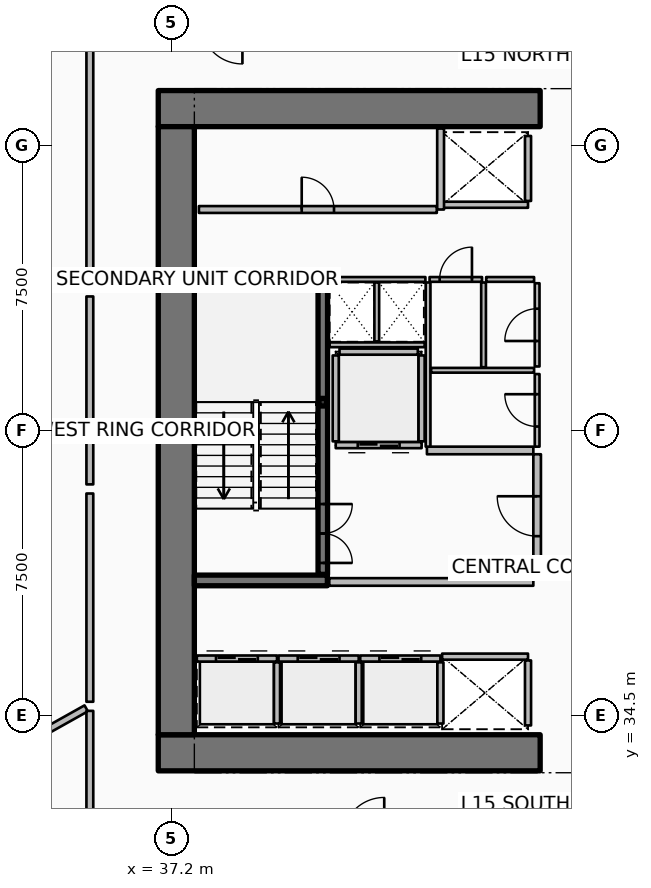
"""IFC4 building model, lengths in metres.
Left out: names, types, materials, properties, quantities, classifications, styles, units other than length and angle.
Written with IfcOpenShell. Run it as: python <this file> out.ifc"""

import sys

from ifc_helpers import new_model, si_unit, direction, frame, frame_2d, origin, origin_2d, place, context, subcontext, project, spatial, rectangle, hollow_rectangle, extrude, element, fill, save


model = new_model("IFC4")
c1 = context("Model", 3, precision=1e-05, world=origin(), true_north=direction((0.0, 1.0)))
c2 = subcontext(c1, "Body", "Model", "MODEL_VIEW")
j1 = project(units=[si_unit("LENGTHUNIT", "METRE"), si_unit("PLANEANGLEUNIT", "RADIAN")], contexts=[c1])
p1 = place(None, origin())
s1 = spatial("IfcSite", under=j1, at=p1, CompositionType="ELEMENT")
p2 = place(p1, origin())
s2 = spatial("IfcBuilding", under=s1, at=p2, CompositionType="ELEMENT")
p3 = place(p2, frame((0.0, 0.0, 63.9)))
s3 = spatial("IfcBuildingStorey", under=s2, at=p3, CompositionType="ELEMENT", Elevation=63.9)
for number, where, z_axis, x_axis in (
    (1, (36.85, 33.525, 0.0), (0.0, 0.0, 1.0), (1.0, 0.0, 0.0)),
    (2, (36.85, 50.475, 0.0), (0.0, 0.0, 1.0), (1.0, 0.0, 0.0)),
):
    element("IfcWall", number, at=place(p3, frame(where, z_axis=z_axis, x_axis=x_axis)), inside=s3, PredefinedType="SHEAR", context=c2, shape_type="SweptSolid", body=[
        extrude(rectangle(XDim=10.05, YDim=0.95, at=frame_2d((5.025, 0.0))), origin(), (0.0, 0.0, 1.0), 3.75),
    ])
p4 = place(p3, frame((37.325, 34.0, 0.0), z_axis=(0.0, 0.0, 1.0), x_axis=(0.0, 1.0, 0.0)))
e3 = element("IfcWall", 3, at=p4, inside=s3, PredefinedType="SHEAR", context=c2, shape_type="SweptSolid", body=[
    extrude(rectangle(XDim=16.0, YDim=0.95, at=frame_2d((8.0, 0.0))), origin(), (0.0, 0.0, 1.0), 3.75),
])
for number, where, z_axis, x_axis in (
    (4, (37.8, 38.06, 0.0), (0.0, 0.0, 1.0), (1.0, 0.0, 0.0)),
    (5, (37.8, 45.94, 0.0), (0.0, 0.0, 1.0), (1.0, 0.0, 0.0)),
):
    element("IfcWall", number, at=place(p3, frame(where, z_axis=z_axis, x_axis=x_axis)), inside=s3, PredefinedType="SHEAR", context=c2, shape_type="SweptSolid", body=[
        extrude(rectangle(XDim=3.5, YDim=0.28, at=frame_2d((1.75, 0.0))), origin(), (0.0, 0.0, 1.0), 3.75),
    ])
p5 = place(p3, frame((41.18, 42.75, 0.0), z_axis=(0.0, 0.0, 1.0), x_axis=(1.0, 0.0, 0.0)))
e6 = element("IfcColumn", 6, at=p5, inside=s3, PredefinedType="COLUMN", context=c2, shape_type="SweptSolid", body=[
    extrude(hollow_rectangle(XDim=0.2, YDim=0.2, WallThickness=0.01, InnerFilletRadius=0.01, OuterFilletRadius=0.02, at=origin_2d()), origin(), (0.0, 0.0, 1.0), 1.67),
])
p6 = place(p3, frame((41.18, 38.22, 0.0), z_axis=(0.0, 0.0, 1.0), x_axis=(0.0, 1.0, 0.0)))
e7 = element("IfcWall", 7, at=p6, inside=s3, PredefinedType="SOLIDWALL", context=c2, shape_type="SweptSolid", body=[
    extrude(rectangle(XDim=7.56, YDim=0.25, at=frame_2d((3.78, 0.0))), origin(), (0.0, 0.0, 1.0), 3.5),
])
p7 = place(p6, frame((0.3, 0.0, 0.0)))
e8 = element("IfcOpeningElement", 8, at=p7, cuts=e7, PredefinedType="OPENING", context=c2, shape_type="SweptSolid", body=[
    extrude(rectangle(XDim=1.55, YDim=2.15, at=frame_2d((0.775, 1.075))), frame((0.0, 0.135, 0.0), z_axis=(0.0, -1.0, 0.0), x_axis=(1.0, 0.0, 0.0)), (0.0, 0.0, 1.0), 0.27),
])
p8 = place(p3, frame((37.865, 36.005, 0.0), z_axis=(0.0, 0.0, 1.0), x_axis=(1.0, 0.0, 0.0)))
e9 = element("IfcWall", 9, at=p8, inside=s3, PredefinedType="PARTITIONING", context=c2, shape_type="SweptSolid", body=[
    extrude(rectangle(XDim=2.11, YDim=0.16, at=frame_2d((1.055, 0.0))), origin(), (0.0, 0.0, 1.0), 3.5),
])
p9 = place(p8, frame((0.505, 0.0, 0.0)))
e10 = element("IfcOpeningElement", 10, at=p9, cuts=e9, PredefinedType="OPENING", context=c2, shape_type="SweptSolid", body=[
    extrude(rectangle(XDim=1.1, YDim=2.1, at=frame_2d((0.55, 1.05))), frame((0.0, 0.09, 0.0), z_axis=(0.0, -1.0, 0.0), x_axis=(1.0, 0.0, 0.0)), (0.0, 0.0, 1.0), 0.18),
])
p10 = place(p3, frame((39.975, 34.295, 0.0), z_axis=(0.0, 0.0, 1.0), x_axis=(0.0, 1.0, 0.0)))
e11 = element("IfcWall", 11, at=p10, inside=s3, PredefinedType="PARTITIONING", context=c2, shape_type="SweptSolid", body=[
    extrude(rectangle(XDim=1.61, YDim=0.16, at=frame_2d((0.805, 0.0))), origin(), (0.0, 0.0, 1.0), 3.5),
])
p11 = place(p3, frame((40.015, 36.005, 0.0), z_axis=(0.0, 0.0, 1.0), x_axis=(1.0, 0.0, 0.0)))
e12 = element("IfcWall", 12, at=p11, inside=s3, PredefinedType="PARTITIONING", context=c2, shape_type="SweptSolid", body=[
    extrude(rectangle(XDim=2.11, YDim=0.16, at=frame_2d((1.055, 0.0))), origin(), (0.0, 0.0, 1.0), 3.5),
])
p12 = place(p11, frame((0.505, 0.0, 0.0)))
e13 = element("IfcOpeningElement", 13, at=p12, cuts=e12, PredefinedType="OPENING", context=c2, shape_type="SweptSolid", body=[
    extrude(rectangle(XDim=1.1, YDim=2.1, at=frame_2d((0.55, 1.05))), frame((0.0, 0.09, 0.0), z_axis=(0.0, -1.0, 0.0), x_axis=(1.0, 0.0, 0.0)), (0.0, 0.0, 1.0), 0.18),
])
p13 = place(p3, frame((42.125, 34.295, 0.0), z_axis=(0.0, 0.0, 1.0), x_axis=(0.0, 1.0, 0.0)))
e14 = element("IfcWall", 14, at=p13, inside=s3, PredefinedType="PARTITIONING", context=c2, shape_type="SweptSolid", body=[
    extrude(rectangle(XDim=1.61, YDim=0.16, at=frame_2d((0.805, 0.0))), origin(), (0.0, 0.0, 1.0), 3.5),
])
p14 = place(p3, frame((42.165, 36.005, 0.0), z_axis=(0.0, 0.0, 1.0), x_axis=(1.0, 0.0, 0.0)))
e15 = element("IfcWall", 15, at=p14, inside=s3, PredefinedType="PARTITIONING", context=c2, shape_type="SweptSolid", body=[
    extrude(rectangle(XDim=2.11, YDim=0.16, at=frame_2d((1.055, 0.0))), origin(), (0.0, 0.0, 1.0), 3.5),
])
p15 = place(p14, frame((0.505, 0.0, 0.0)))
e16 = element("IfcOpeningElement", 16, at=p15, cuts=e15, PredefinedType="OPENING", context=c2, shape_type="SweptSolid", body=[
    extrude(rectangle(XDim=1.1, YDim=2.1, at=frame_2d((0.55, 1.05))), frame((0.0, 0.09, 0.0), z_axis=(0.0, -1.0, 0.0), x_axis=(1.0, 0.0, 0.0)), (0.0, 0.0, 1.0), 0.18),
])
p16 = place(p3, frame((44.275, 34.295, 0.0), z_axis=(0.0, 0.0, 1.0), x_axis=(0.0, 1.0, 0.0)))
e17 = element("IfcWall", 17, at=p16, inside=s3, PredefinedType="PARTITIONING", context=c2, shape_type="SweptSolid", body=[
    extrude(rectangle(XDim=1.61, YDim=0.16, at=frame_2d((0.805, 0.0))), origin(), (0.0, 0.0, 1.0), 3.5),
])
p17 = place(p3, frame((46.58, 47.945, 0.0), z_axis=(0.0, 0.0, 1.0), x_axis=(-1.0, 0.0, 0.0)))
e18 = element("IfcWall", 18, at=p17, inside=s3, PredefinedType="PARTITIONING", context=c2, shape_type="SweptSolid", body=[
    extrude(rectangle(XDim=2.26, YDim=0.16, at=frame_2d((1.13, 0.0))), origin(), (0.0, 0.0, 1.0), 3.5),
])
p18 = place(p3, frame((46.58, 48.045, 0.0), z_axis=(0.0, 0.0, 1.0), x_axis=(0.0, 1.0, 0.0)))
e19 = element("IfcWall", 19, at=p18, inside=s3, PredefinedType="PARTITIONING", context=c2, shape_type="SweptSolid", body=[
    extrude(rectangle(XDim=1.71, YDim=0.16, at=frame_2d((0.855, 0.0))), origin(), (0.0, 0.0, 1.0), 3.5),
])
p19 = place(p3, frame((44.32, 36.055, 0.0), z_axis=(0.0, 0.0, 1.0), x_axis=(1.0, 0.0, 0.0)))
e20 = element("IfcWall", 20, at=p19, inside=s3, PredefinedType="PARTITIONING", context=c2, shape_type="SweptSolid", body=[
    extrude(rectangle(XDim=2.26, YDim=0.16, at=frame_2d((1.13, 0.0))), origin(), (0.0, 0.0, 1.0), 3.5),
])
p20 = place(p3, frame((46.58, 34.245, 0.0), z_axis=(0.0, 0.0, 1.0), x_axis=(0.0, 1.0, 0.0)))
e21 = element("IfcWall", 21, at=p20, inside=s3, PredefinedType="PARTITIONING", context=c2, shape_type="SweptSolid", body=[
    extrude(rectangle(XDim=1.71, YDim=0.16, at=frame_2d((0.855, 0.0))), origin(), (0.0, 0.0, 1.0), 3.5),
])
p21 = place(p3, frame((43.78, 41.62, 0.0), z_axis=(0.0, 0.0, 1.0), x_axis=(-1.0, 0.0, 0.0)))
e22 = element("IfcWall", 22, at=p21, inside=s3, PredefinedType="PARTITIONING", context=c2, shape_type="SweptSolid", body=[
    extrude(rectangle(XDim=2.26, YDim=0.16, at=frame_2d((1.13, 0.0))), origin(), (0.0, 0.0, 1.0), 3.5),
])
p22 = place(p21, frame((0.58, 0.0, 0.0)))
e23 = element("IfcOpeningElement", 23, at=p22, cuts=e22, PredefinedType="OPENING", context=c2, shape_type="SweptSolid", body=[
    extrude(rectangle(XDim=1.1, YDim=2.1, at=frame_2d((0.55, 1.05))), frame((0.0, 0.09, 0.0), z_axis=(0.0, -1.0, 0.0), x_axis=(1.0, 0.0, 0.0)), (0.0, 0.0, 1.0), 0.18),
])
for number, where, z_axis, x_axis in (
    (24, (43.78, 41.72, 0.0), (0.0, 0.0, 1.0), (0.0, 1.0, 0.0)),
    (25, (41.52, 41.72, 0.0), (0.0, 0.0, 1.0), (0.0, 1.0, 0.0)),
):
    element("IfcWall", number, at=place(p3, frame(where, z_axis=z_axis, x_axis=x_axis)), inside=s3, PredefinedType="PARTITIONING", context=c2, shape_type="SweptSolid", body=[
        extrude(rectangle(XDim=2.26, YDim=0.16, at=frame_2d((1.13, 0.0))), origin(), (0.0, 0.0, 1.0), 3.5),
    ])
p23 = place(p3, frame((41.62, 44.08, 0.0), z_axis=(0.0, 0.0, 1.0), x_axis=(1.0, 0.0, 0.0)))
e26 = element("IfcWall", 26, at=p23, inside=s3, PredefinedType="PARTITIONING", context=c2, shape_type="SweptSolid", body=[
    extrude(rectangle(XDim=2.06, YDim=0.16, at=frame_2d((1.03, 0.0))), origin(), (0.0, 0.0, 1.0), 3.5),
])
p24 = place(p3, frame((37.92, 47.82, 0.0), z_axis=(0.0, 0.0, 1.0), x_axis=(1.0, 0.0, 0.0)))
e27 = element("IfcWall", 27, at=p24, inside=s3, PredefinedType="PARTITIONING", context=c2, shape_type="SweptSolid", body=[
    extrude(rectangle(XDim=6.26, YDim=0.18, at=frame_2d((3.13, 0.0))), origin(), (0.0, 0.0, 1.0), 3.5),
])
p25 = place(p24, frame((2.705, 0.0, 0.0)))
e28 = element("IfcOpeningElement", 28, at=p25, cuts=e27, PredefinedType="OPENING", context=c2, shape_type="SweptSolid", body=[
    extrude(rectangle(XDim=0.85, YDim=2.06, at=frame_2d((0.425, 1.03))), frame((0.0, 0.1, 0.0), z_axis=(0.0, -1.0, 0.0), x_axis=(1.0, 0.0, 0.0)), (0.0, 0.0, 1.0), 0.2),
])
p26 = place(p3, frame((44.28, 47.82, 0.0), z_axis=(0.0, 0.0, 1.0), x_axis=(0.0, 1.0, 0.0)))
e29 = element("IfcWall", 29, at=p26, inside=s3, PredefinedType="PARTITIONING", context=c2, shape_type="SweptSolid", body=[
    extrude(rectangle(XDim=2.13, YDim=0.18, at=frame_2d((1.065, 0.0))), origin(), (0.0, 0.0, 1.0), 3.5),
])
p27 = place(p3, frame((41.35, 38.02, 0.0), z_axis=(0.0, 0.0, 1.0), x_axis=(1.0, 0.0, 0.0)))
e30 = element("IfcWall", 30, at=p27, inside=s3, PredefinedType="PARTITIONING", context=c2, shape_type="SweptSolid", body=[
    extrude(rectangle(XDim=5.37, YDim=0.2, at=frame_2d((2.685, 0.0))), origin(), (0.0, 0.0, 1.0), 3.5),
])
p28 = place(p3, frame((43.92, 41.48, 0.0), z_axis=(0.0, 0.0, 1.0), x_axis=(1.0, 0.0, 0.0)))
e31 = element("IfcWall", 31, at=p28, inside=s3, PredefinedType="PARTITIONING", context=c2, shape_type="SweptSolid", body=[
    extrude(rectangle(XDim=2.8, YDim=0.2, at=frame_2d((1.4, 0.0))), origin(), (0.0, 0.0, 1.0), 3.5),
])
p29 = place(p3, frame((46.82, 38.12, 0.0), z_axis=(0.0, 0.0, 1.0), x_axis=(0.0, 1.0, 0.0)))
e32 = element("IfcWall", 32, at=p29, inside=s3, PredefinedType="PARTITIONING", context=c2, shape_type="SweptSolid", body=[
    extrude(rectangle(XDim=3.26, YDim=0.2, at=frame_2d((1.63, 0.0))), origin(), (0.0, 0.0, 1.0), 3.5),
])
p30 = place(p29, frame((1.105, 0.0, 0.0)))
e33 = element("IfcOpeningElement", 33, at=p30, cuts=e32, PredefinedType="OPENING", context=c2, shape_type="SweptSolid", body=[
    extrude(rectangle(XDim=1.05, YDim=2.1, at=frame_2d((0.525, 1.05))), frame((0.0, 0.11, 0.0), z_axis=(0.0, -1.0, 0.0), x_axis=(1.0, 0.0, 0.0)), (0.0, 0.0, 1.0), 0.22),
])
p31 = place(p3, frame((41.36, 44.26, 0.0), z_axis=(0.0, 0.0, 1.0), x_axis=(1.0, 0.0, 0.0)))
e34 = element("IfcWall", 34, at=p31, inside=s3, PredefinedType="PARTITIONING", context=c2, shape_type="SweptSolid", body=[
    extrude(rectangle(XDim=2.5, YDim=0.125, at=frame_2d((1.25, 0.0))), origin(), (0.0, 0.0, 1.0), 2.94),
])
p32 = place(p3, frame((42.6, 44.35, 0.0), z_axis=(0.0, 0.0, 1.0), x_axis=(0.0, 1.0, 0.0)))
e35 = element("IfcWall", 35, at=p32, inside=s3, PredefinedType="PARTITIONING", context=c2, shape_type="SweptSolid", body=[
    extrude(rectangle(XDim=1.55, YDim=0.125, at=frame_2d((0.775, 0.0))), origin(), (0.0, 0.0, 1.0), 2.94),
])
p33 = place(p3, frame((43.95, 41.58, 0.0), z_axis=(0.0, 0.0, 1.0), x_axis=(0.0, 1.0, 0.0)))
e36 = element("IfcWall", 36, at=p33, inside=s3, PredefinedType="PARTITIONING", context=c2, shape_type="SweptSolid", body=[
    extrude(rectangle(XDim=4.32, YDim=0.125, at=frame_2d((2.16, 0.0))), origin(), (0.0, 0.0, 1.0), 2.94),
])
p34 = place(p3, frame((44.03, 43.59, 0.0), z_axis=(0.0, 0.0, 1.0), x_axis=(1.0, 0.0, 0.0)))
e37 = element("IfcWall", 37, at=p34, inside=s3, PredefinedType="PARTITIONING", context=c2, shape_type="SweptSolid", body=[
    extrude(rectangle(XDim=2.71, YDim=0.125, at=frame_2d((1.355, 0.0))), origin(), (0.0, 0.0, 1.0), 2.94),
])
p35 = place(p3, frame((45.41, 43.67, 0.0), z_axis=(0.0, 0.0, 1.0), x_axis=(0.0, 1.0, 0.0)))
e38 = element("IfcWall", 38, at=p35, inside=s3, PredefinedType="PARTITIONING", context=c2, shape_type="SweptSolid", body=[
    extrude(rectangle(XDim=2.23, YDim=0.125, at=frame_2d((1.115, 0.0))), origin(), (0.0, 0.0, 1.0), 2.94),
])
p36 = place(p3, frame((46.82, 41.58, 0.0), z_axis=(0.0, 0.0, 1.0), x_axis=(0.0, 1.0, 0.0)))
e39 = element("IfcWall", 39, at=p36, inside=s3, PredefinedType="PARTITIONING", context=c2, shape_type="SweptSolid", body=[
    extrude(rectangle(XDim=1.91, YDim=0.125, at=frame_2d((0.955, 0.0))), origin(), (0.0, 0.0, 1.0), 2.94),
])
p37 = place(p36, frame((0.53, 0.0, 0.0)))
e40 = element("IfcOpeningElement", 40, at=p37, cuts=e39, PredefinedType="OPENING", context=c2, shape_type="SweptSolid", body=[
    extrude(rectangle(XDim=0.85, YDim=2.06, at=frame_2d((0.425, 1.03))), frame((0.0, 0.073, 0.0), z_axis=(0.0, -1.0, 0.0), x_axis=(1.0, 0.0, 0.0)), (0.0, 0.0, 1.0), 0.145),
])
p38 = place(p3, frame((46.82, 43.69, 0.0), z_axis=(0.0, 0.0, 1.0), x_axis=(0.0, 1.0, 0.0)))
e41 = element("IfcWall", 41, at=p38, inside=s3, PredefinedType="PARTITIONING", context=c2, shape_type="SweptSolid", body=[
    extrude(rectangle(XDim=2.19, YDim=0.125, at=frame_2d((1.095, 0.0))), origin(), (0.0, 0.0, 1.0), 2.94),
])
p39 = place(p38, frame((0.67, 0.0, 0.0)))
e42 = element("IfcOpeningElement", 42, at=p39, cuts=e41, PredefinedType="OPENING", context=c2, shape_type="SweptSolid", body=[
    extrude(rectangle(XDim=0.85, YDim=2.06, at=frame_2d((0.425, 1.03))), frame((0.0, 0.073, 0.0), z_axis=(0.0, -1.0, 0.0), x_axis=(1.0, 0.0, 0.0)), (0.0, 0.0, 1.0), 0.145),
])
p40 = place(p3, frame((41.35, 45.98, 0.0), z_axis=(0.0, 0.0, 1.0), x_axis=(1.0, 0.0, 0.0)))
e43 = element("IfcWall", 43, at=p40, inside=s3, PredefinedType="PARTITIONING", context=c2, shape_type="SweptSolid", body=[
    extrude(rectangle(XDim=2.53, YDim=0.125, at=frame_2d((1.265, 0.0))), origin(), (0.0, 0.0, 1.0), 2.94),
])
p41 = place(p3, frame((43.99, 45.98, 0.0), z_axis=(0.0, 0.0, 1.0), x_axis=(1.0, 0.0, 0.0)))
e44 = element("IfcWall", 44, at=p41, inside=s3, PredefinedType="PARTITIONING", context=c2, shape_type="SweptSolid", body=[
    extrude(rectangle(XDim=1.38, YDim=0.125, at=frame_2d((0.69, 0.0))), origin(), (0.0, 0.0, 1.0), 2.94),
])
p42 = place(p41, frame((0.265, 0.0, 0.0)))
e45 = element("IfcOpeningElement", 45, at=p42, cuts=e44, PredefinedType="OPENING", context=c2, shape_type="SweptSolid", body=[
    extrude(rectangle(XDim=0.85, YDim=2.06, at=frame_2d((0.425, 1.03))), frame((0.0, 0.073, 0.0), z_axis=(0.0, -1.0, 0.0), x_axis=(1.0, 0.0, 0.0)), (0.0, 0.0, 1.0), 0.145),
])
p43 = place(p3, frame((45.48, 45.98, 0.0), z_axis=(0.0, 0.0, 1.0), x_axis=(1.0, 0.0, 0.0)))
e46 = element("IfcWall", 46, at=p43, inside=s3, PredefinedType="PARTITIONING", context=c2, shape_type="SweptSolid", body=[
    extrude(rectangle(XDim=1.26, YDim=0.125, at=frame_2d((0.63, 0.0))), origin(), (0.0, 0.0, 1.0), 2.94),
])
p44 = place(p3, frame((34.954, 34.694, 0.0), z_axis=(0.0, 0.0, 1.0), x_axis=(-0.872493465611, -0.488625779577, 0.0)))
e47 = element("IfcWall", 47, at=p44, inside=s3, PredefinedType="PARTITIONING", context=c2, shape_type="SweptSolid", body=[
    extrude(rectangle(XDim=16.586, YDim=0.18, at=frame_2d((8.293, 0.0))), origin(), (0.0, 0.0, 1.0), 2.867),
])
p45 = place(p3, frame((35.05, 52.089, 0.0), z_axis=(0.0, 0.0, 1.0), x_axis=(0.0, -1.0, 0.0)))
e48 = element("IfcWall", 48, at=p45, inside=s3, PredefinedType="PARTITIONING", context=c2, shape_type="SweptSolid", body=[
    extrude(rectangle(XDim=6.317, YDim=0.18, at=frame_2d((3.158, 0.0))), origin(), (0.0, 0.0, 1.0), 2.867),
])
p46 = place(p3, frame((35.05, 45.532, 0.0), z_axis=(0.0, 0.0, 1.0), x_axis=(0.0, -1.0, 0.0)))
e49 = element("IfcWall", 49, at=p46, inside=s3, PredefinedType="PARTITIONING", context=c2, shape_type="SweptSolid", body=[
    extrude(rectangle(XDim=4.945, YDim=0.18, at=frame_2d((2.472, 0.0))), origin(), (0.0, 0.0, 1.0), 2.867),
])
p47 = place(p3, frame((35.05, 40.347, 0.0), z_axis=(0.0, 0.0, 1.0), x_axis=(0.0, -1.0, 0.0)))
e50 = element("IfcWall", 50, at=p47, inside=s3, PredefinedType="PARTITIONING", context=c2, shape_type="SweptSolid", body=[
    extrude(rectangle(XDim=5.48, YDim=0.18, at=frame_2d((2.74, 0.0))), origin(), (0.0, 0.0, 1.0), 2.867),
])
p48 = place(p3, frame((35.05, 34.628, 0.0), z_axis=(0.0, 0.0, 1.0), x_axis=(0.0, -1.0, 0.0)))
e51 = element("IfcWall", 51, at=p48, inside=s3, PredefinedType="PARTITIONING", context=c2, shape_type="SweptSolid", body=[
    extrude(rectangle(XDim=3.258, YDim=0.18, at=frame_2d((1.629, 0.0))), origin(), (0.0, 0.0, 1.0), 2.867),
])
p49 = place(p7, origin())
e52 = element("IfcDoor", 52, at=p49, inside=s3, OperationType="DOUBLE_DOOR_SINGLE_SWING", PredefinedType="DOOR", context=c2, shape_type="SweptSolid", body=[
    extrude(rectangle(XDim=1.55, YDim=2.15, at=frame_2d((0.775, 1.075))), frame((0.0, 0.025, 0.0), z_axis=(0.0, -1.0, 0.0), x_axis=(1.0, 0.0, 0.0)), (0.0, 0.0, 1.0), 0.05),
])
fill(e8, e52)
p50 = place(p9, origin())
e53 = element("IfcDoor", 53, at=p50, inside=s3, OperationType="DOUBLE_DOOR_SLIDING", PredefinedType="DOOR", context=c2, shape_type="SweptSolid", body=[
    extrude(rectangle(XDim=1.1, YDim=2.1, at=frame_2d((0.55, 1.05))), frame((0.0, 0.025, 0.0), z_axis=(0.0, -1.0, 0.0), x_axis=(1.0, 0.0, 0.0)), (0.0, 0.0, 1.0), 0.05),
])
fill(e10, e53)
p51 = place(p12, origin())
e54 = element("IfcDoor", 54, at=p51, inside=s3, OperationType="DOUBLE_DOOR_SLIDING", PredefinedType="DOOR", context=c2, shape_type="SweptSolid", body=[
    extrude(rectangle(XDim=1.1, YDim=2.1, at=frame_2d((0.55, 1.05))), frame((0.0, 0.025, 0.0), z_axis=(0.0, -1.0, 0.0), x_axis=(1.0, 0.0, 0.0)), (0.0, 0.0, 1.0), 0.05),
])
fill(e13, e54)
p52 = place(p15, origin())
e55 = element("IfcDoor", 55, at=p52, inside=s3, OperationType="DOUBLE_DOOR_SLIDING", PredefinedType="DOOR", context=c2, shape_type="SweptSolid", body=[
    extrude(rectangle(XDim=1.1, YDim=2.1, at=frame_2d((0.55, 1.05))), frame((0.0, 0.025, 0.0), z_axis=(0.0, -1.0, 0.0), x_axis=(1.0, 0.0, 0.0)), (0.0, 0.0, 1.0), 0.05),
])
fill(e16, e55)
p53 = place(p22, origin())
e56 = element("IfcDoor", 56, at=p53, inside=s3, OperationType="DOUBLE_DOOR_SLIDING", PredefinedType="DOOR", context=c2, shape_type="SweptSolid", body=[
    extrude(rectangle(XDim=1.1, YDim=2.1, at=frame_2d((0.55, 1.05))), frame((0.0, 0.025, 0.0), z_axis=(0.0, -1.0, 0.0), x_axis=(1.0, 0.0, 0.0)), (0.0, 0.0, 1.0), 0.05),
])
fill(e23, e56)
p54 = place(p25, origin())
e57 = element("IfcDoor", 57, at=p54, inside=s3, OperationType="SINGLE_SWING_LEFT", PredefinedType="DOOR", context=c2, shape_type="SweptSolid", body=[
    extrude(rectangle(XDim=0.85, YDim=2.06, at=frame_2d((0.425, 1.03))), frame((0.0, 0.025, 0.0), z_axis=(0.0, -1.0, 0.0), x_axis=(1.0, 0.0, 0.0)), (0.0, 0.0, 1.0), 0.05),
])
fill(e28, e57)
p55 = place(p30, origin())
e58 = element("IfcDoor", 58, at=p55, inside=s3, OperationType="SINGLE_SWING_RIGHT", PredefinedType="DOOR", context=c2, shape_type="SweptSolid", body=[
    extrude(rectangle(XDim=1.05, YDim=2.1, at=frame_2d((0.525, 1.05))), frame((0.0, 0.025, 0.0), z_axis=(0.0, -1.0, 0.0), x_axis=(1.0, 0.0, 0.0)), (0.0, 0.0, 1.0), 0.05),
])
fill(e33, e58)
p56 = place(p37, origin())
e59 = element("IfcDoor", 59, at=p56, inside=s3, OperationType="SINGLE_SWING_RIGHT", PredefinedType="DOOR", context=c2, shape_type="SweptSolid", body=[
    extrude(rectangle(XDim=0.85, YDim=2.06, at=frame_2d((0.425, 1.03))), frame((0.0, 0.025, 0.0), z_axis=(0.0, -1.0, 0.0), x_axis=(1.0, 0.0, 0.0)), (0.0, 0.0, 1.0), 0.05),
])
fill(e40, e59)
p57 = place(p39, origin())
e60 = element("IfcDoor", 60, at=p57, inside=s3, OperationType="SINGLE_SWING_LEFT", PredefinedType="DOOR", context=c2, shape_type="SweptSolid", body=[
    extrude(rectangle(XDim=0.85, YDim=2.06, at=frame_2d((0.425, 1.03))), frame((0.0, 0.025, 0.0), z_axis=(0.0, -1.0, 0.0), x_axis=(1.0, 0.0, 0.0)), (0.0, 0.0, 1.0), 0.05),
])
fill(e42, e60)
p58 = place(p42, origin())
e61 = element("IfcDoor", 61, at=p58, inside=s3, OperationType="SINGLE_SWING_RIGHT", PredefinedType="DOOR", context=c2, shape_type="SweptSolid", body=[
    extrude(rectangle(XDim=0.85, YDim=2.06, at=frame_2d((0.425, 1.03))), frame((0.0, 0.025, 0.0), z_axis=(0.0, -1.0, 0.0), x_axis=(1.0, 0.0, 0.0)), (0.0, 0.0, 1.0), 0.05),
])
fill(e45, e61)
save(model, sys.argv[1])
